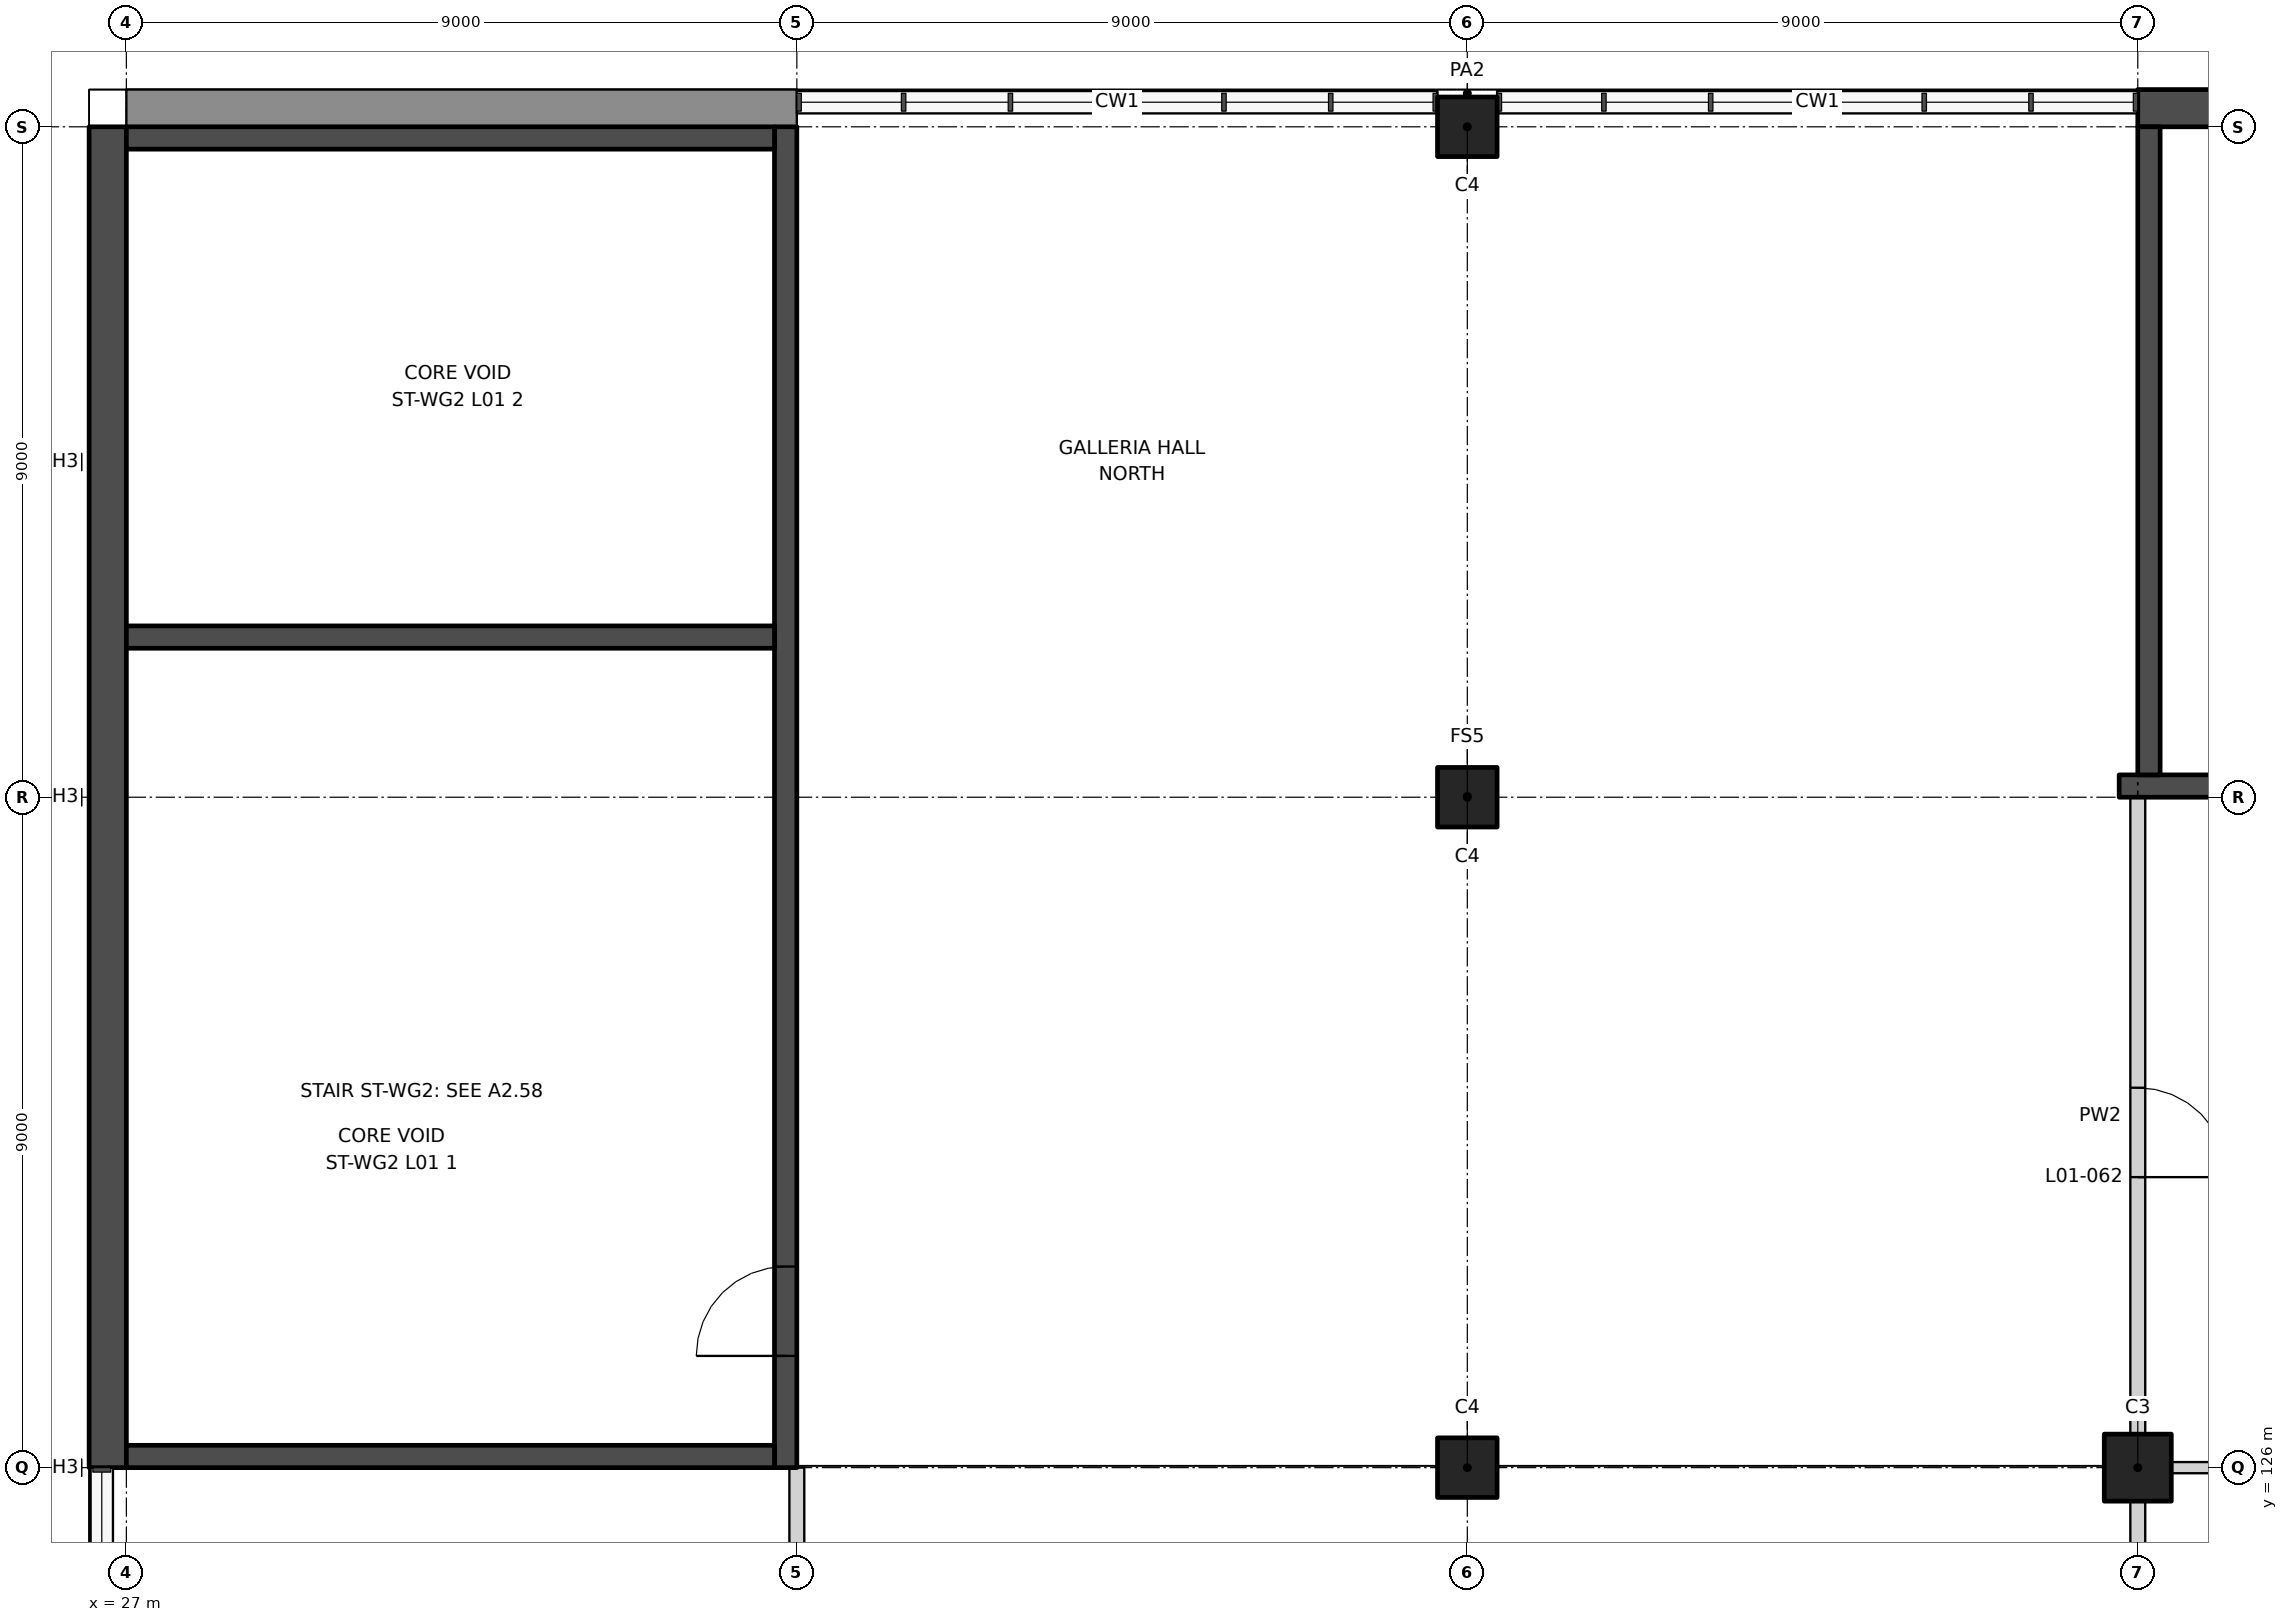
"""IFC4 building model, lengths in metres.
Left out: names, types, materials, properties, quantities, classifications, styles, units other than length and angle.
Written with IfcOpenShell. Run it as: python <this file> out.ifc"""

import sys

from ifc_helpers import new_model, si_unit, direction, frame, frame_2d, origin, origin_2d, place, context, subcontext, project, spatial, rectangle, extrude, element, fill, save


model = new_model("IFC4")
c1 = context("Model", 3, precision=1e-05, world=origin(), true_north=direction((0.0, 1.0)))
c2 = subcontext(c1, "Body", "Model", "MODEL_VIEW")
j1 = project(units=[si_unit("LENGTHUNIT", "METRE"), si_unit("PLANEANGLEUNIT", "RADIAN")], contexts=[c1])
p1 = place(None, origin())
s1 = spatial("IfcSite", under=j1, at=p1, CompositionType="ELEMENT")
p2 = place(p1, origin())
s2 = spatial("IfcBuilding", under=s1, at=p2, CompositionType="ELEMENT")
p3 = place(p2, frame((0.0, 0.0, 7.0)))
s3 = spatial("IfcBuildingStorey", under=s2, at=p3, CompositionType="ELEMENT", Elevation=7.0)
p4 = place(p3, frame((54.0, 126.0, 0.0), z_axis=(0.0, 0.0, 1.0), x_axis=(1.0, 0.0, 0.0)))
e1 = element("IfcColumn", 1, at=p4, inside=s3, PredefinedType="COLUMN", context=c2, shape_type="SweptSolid", body=[
    extrude(rectangle(XDim=0.9, YDim=0.9, at=origin_2d()), origin(), (0.0, 0.0, 1.0), 4.5),
])
for number, where, z_axis, x_axis in (
    (2, (45.0, 126.0, 0.0), (0.0, 0.0, 1.0), (1.0, 0.0, 0.0)),
    (3, (45.0, 135.0, 0.0), (0.0, 0.0, 1.0), (1.0, 0.0, 0.0)),
    (4, (45.0, 144.0, 0.0), (0.0, 0.0, 1.0), (1.0, 0.0, 0.0)),
):
    element("IfcColumn", number, at=place(p3, frame(where, z_axis=z_axis, x_axis=x_axis)), inside=s3, PredefinedType="COLUMN", context=c2, shape_type="SweptSolid", body=[
        extrude(rectangle(XDim=0.8, YDim=0.8, at=origin_2d()), origin(), (0.0, 0.0, 1.0), 4.5),
    ])
p5 = place(p3, frame((54.45, 126.0, 0.0), z_axis=(0.0, 0.0, 1.0), x_axis=(1.0, 0.0, 0.0)))
e5 = element("IfcWall", 5, at=p5, inside=s3, PredefinedType="PARTITIONING", context=c2, shape_type="SweptSolid", body=[
    extrude(rectangle(XDim=8.15, YDim=0.15, at=frame_2d((4.075, 0.0))), origin(), (0.0, 0.0, 1.0), 3.25),
])
p6 = place(p3, frame((36.0, 117.4, 0.0), z_axis=(0.0, 0.0, 1.0), x_axis=(0.0, 1.0, 0.0)))
e6 = element("IfcWall", 6, at=p6, inside=s3, PredefinedType="PARTITIONING", context=c2, shape_type="SweptSolid", body=[
    extrude(rectangle(XDim=8.6, YDim=0.2, at=frame_2d((4.3, 0.0))), origin(), (0.0, 0.0, 1.0), 3.25),
])
p7 = place(p6, frame((3.4, 0.0, 0.0)))
e7 = element("IfcOpeningElement", 7, at=p7, cuts=e6, PredefinedType="OPENING", context=c2, shape_type="SweptSolid", body=[
    extrude(rectangle(XDim=1.8, YDim=2.1, at=frame_2d((0.9, 1.05))), frame((0.0, 0.11, 0.0), z_axis=(0.0, -1.0, 0.0), x_axis=(1.0, 0.0, 0.0)), (0.0, 0.0, 1.0), 0.22),
])
p8 = place(p3, frame((54.0, 117.45, 0.0), z_axis=(0.0, 0.0, 1.0), x_axis=(0.0, 1.0, 0.0)))
e8 = element("IfcWall", 8, at=p8, inside=s3, PredefinedType="PARTITIONING", context=c2, shape_type="SweptSolid", body=[
    extrude(rectangle(XDim=8.1, YDim=0.2, at=frame_2d((4.05, 0.0))), origin(), (0.0, 0.0, 1.0), 3.25),
])
p9 = place(p3, frame((54.0, 126.45, 0.0), z_axis=(0.0, 0.0, 1.0), x_axis=(0.0, 1.0, 0.0)))
e9 = element("IfcWall", 9, at=p9, inside=s3, PredefinedType="PARTITIONING", context=c2, shape_type="SweptSolid", body=[
    extrude(rectangle(XDim=8.55, YDim=0.2, at=frame_2d((4.275, 0.0))), origin(), (0.0, 0.0, 1.0), 3.25),
])
p10 = place(p9, frame((3.45, 0.0, 0.0)))
e10 = element("IfcOpeningElement", 10, at=p10, cuts=e9, PredefinedType="OPENING", context=c2, shape_type="SweptSolid", body=[
    extrude(rectangle(XDim=1.2, YDim=2.1, at=frame_2d((0.6, 1.05))), frame((0.0, 0.11, 0.0), z_axis=(0.0, -1.0, 0.0), x_axis=(1.0, 0.0, 0.0)), (0.0, 0.0, 1.0), 0.22),
])
p11 = place(p3, frame((36.0, 144.25, 0.0), z_axis=(0.0, 0.0, 1.0), x_axis=(-1.0, 0.0, 0.0)))
e11 = element("IfcWall", 11, at=p11, inside=s3, PredefinedType="SOLIDWALL", context=c2, shape_type="SweptSolid", body=[
    extrude(rectangle(XDim=9.0, YDim=0.5, at=frame_2d((4.5, 0.0))), origin(), (0.0, 0.0, 1.0), 4.5),
])
p12 = place(p3, frame((72.0, 135.15, 0.0), z_axis=(0.0, 0.0, 1.0), x_axis=(-1.0, 0.0, 0.0)))
e12 = element("IfcWall", 12, at=p12, inside=s3, PredefinedType="SHEAR", context=c2, shape_type="SweptSolid", body=[
    extrude(rectangle(XDim=18.25, YDim=0.3, at=frame_2d((9.125, 0.0))), origin(), (0.0, 0.0, 1.0), 4.5),
])
p13 = place(p12, frame((8.6, 0.0, 0.0)))
e13 = element("IfcOpeningElement", 13, at=p13, cuts=e12, PredefinedType="OPENING", context=c2, shape_type="SweptSolid", body=[
    extrude(rectangle(XDim=1.2, YDim=2.1, at=frame_2d((0.6, 1.05))), frame((0.0, 0.16, 0.0), z_axis=(0.0, -1.0, 0.0), x_axis=(1.0, 0.0, 0.0)), (0.0, 0.0, 1.0), 0.32),
])
p14 = place(p3, frame((72.0, 144.25, 0.0), z_axis=(0.0, 0.0, 1.0), x_axis=(-1.0, 0.0, 0.0)))
e14 = element("IfcWall", 14, at=p14, inside=s3, PredefinedType="SHEAR", context=c2, shape_type="SweptSolid", body=[
    extrude(rectangle(XDim=18.0, YDim=0.5, at=frame_2d((9.0, 0.0))), origin(), (0.0, 0.0, 1.0), 4.5),
])
p15 = place(p3, frame((54.15, 135.3, 0.0), z_axis=(0.0, 0.0, 1.0), x_axis=(0.0, 1.0, 0.0)))
e15 = element("IfcWall", 15, at=p15, inside=s3, PredefinedType="SHEAR", context=c2, shape_type="SweptSolid", body=[
    extrude(rectangle(XDim=8.7, YDim=0.3, at=frame_2d((4.35, 0.0))), origin(), (0.0, 0.0, 1.0), 4.5),
])
p16 = place(p3, frame((35.85, 126.0, 0.0), z_axis=(0.0, 0.0, 1.0), x_axis=(0.0, 1.0, 0.0)))
e16 = element("IfcWall", 16, at=p16, inside=s3, PredefinedType="SHEAR", context=c2, shape_type="SweptSolid", body=[
    extrude(rectangle(XDim=18.0, YDim=0.3, at=frame_2d((9.0, 0.0))), origin(), (0.0, 0.0, 1.0), 4.5),
])
p17 = place(p16, frame((1.5, 0.0, 0.0)))
e17 = element("IfcOpeningElement", 17, at=p17, cuts=e16, PredefinedType="OPENING", context=c2, shape_type="SweptSolid", body=[
    extrude(rectangle(XDim=1.2, YDim=2.1, at=frame_2d((0.6, 1.05))), frame((0.0, 0.16, 0.0), z_axis=(0.0, -1.0, 0.0), x_axis=(1.0, 0.0, 0.0)), (0.0, 0.0, 1.0), 0.32),
])
p18 = place(p3, frame((26.75, 126.0, 0.0), z_axis=(0.0, 0.0, 1.0), x_axis=(0.0, 1.0, 0.0)))
e18 = element("IfcWall", 18, at=p18, inside=s3, PredefinedType="SHEAR", context=c2, shape_type="SweptSolid", body=[
    extrude(rectangle(XDim=18.0, YDim=0.5, at=frame_2d((9.0, 0.0))), origin(), (0.0, 0.0, 1.0), 4.5),
])
for number, where, z_axis, x_axis in (
    (19, (35.7, 126.15, 0.0), (0.0, 0.0, 1.0), (-1.0, 0.0, 0.0)),
    (20, (35.7, 143.85, 0.0), (0.0, 0.0, 1.0), (-1.0, 0.0, 0.0)),
    (21, (35.7, 137.15, 0.0), (0.0, 0.0, 1.0), (-1.0, 0.0, 0.0)),
):
    element("IfcWall", number, at=place(p3, frame(where, z_axis=z_axis, x_axis=x_axis)), inside=s3, PredefinedType="SHEAR", context=c2, shape_type="SweptSolid", body=[
        extrude(rectangle(XDim=8.7, YDim=0.3, at=frame_2d((4.35, 0.0))), origin(), (0.0, 0.0, 1.0), 4.5),
    ])
p19 = place(p10, frame((1.2, 0.0, 0.0), z_axis=(0.0, 0.0, 1.0), x_axis=(-1.0, 0.0, 0.0)))
e22 = element("IfcDoor", 22, at=p19, inside=s3, OperationType="SINGLE_SWING_RIGHT", PredefinedType="DOOR", context=c2, shape_type="SweptSolid", body=[
    extrude(rectangle(XDim=1.2, YDim=2.1, at=frame_2d((0.6, 1.05))), frame((0.0, 0.025, 0.0), z_axis=(0.0, -1.0, 0.0), x_axis=(1.0, 0.0, 0.0)), (0.0, 0.0, 1.0), 0.05),
])
fill(e10, e22)
p20 = place(p17, origin())
e23 = element("IfcDoor", 23, at=p20, inside=s3, OperationType="SINGLE_SWING_LEFT", PredefinedType="DOOR", context=c2, shape_type="SweptSolid", body=[
    extrude(rectangle(XDim=1.2, YDim=2.1, at=frame_2d((0.6, 1.05))), frame((0.0, 0.025, 0.0), z_axis=(0.0, -1.0, 0.0), x_axis=(1.0, 0.0, 0.0)), (0.0, 0.0, 1.0), 0.05),
])
fill(e17, e23)
save(model, sys.argv[1])
